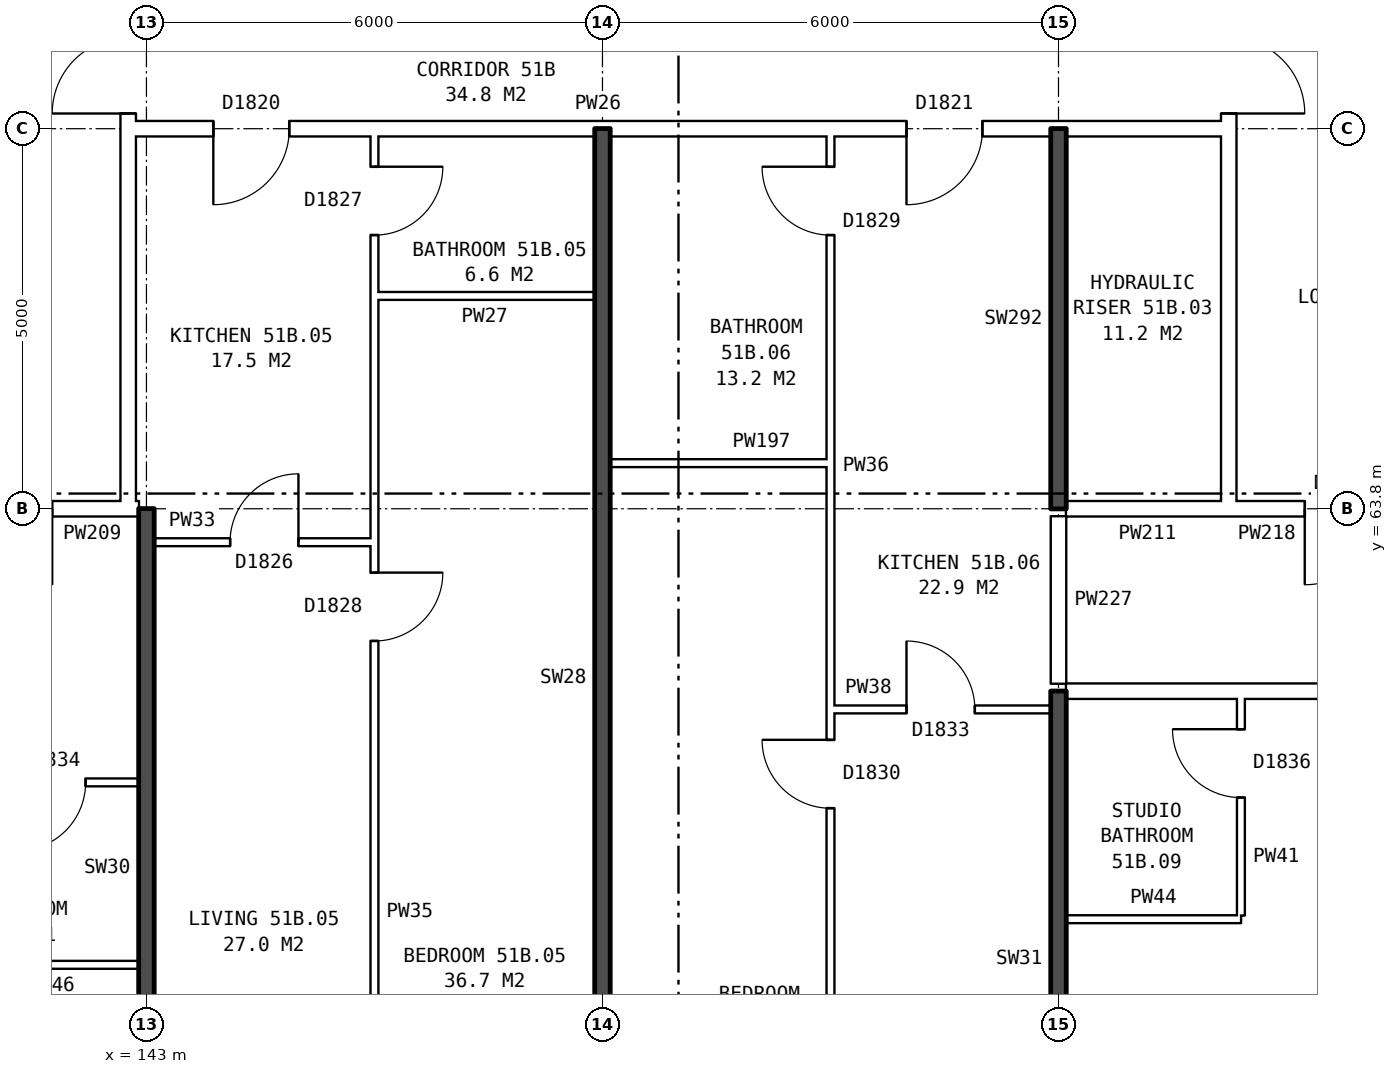
"""IFC4 building model, lengths in metres.
Left out: names, types, materials, properties, quantities, classifications, styles, units other than length and angle.
Written with IfcOpenShell. Run it as: python <this file> out.ifc"""

import sys

from ifc_helpers import new_model, si_unit, direction, frame, frame_2d, origin, place, context, subcontext, project, spatial, rectangle, extrude, element, fill, save


model = new_model("IFC4")
c1 = context("Model", 3, precision=1e-05, world=origin(), true_north=direction((0.0, 1.0)))
c2 = subcontext(c1, "Body", "Model", "MODEL_VIEW")
j1 = project(units=[si_unit("LENGTHUNIT", "METRE"), si_unit("PLANEANGLEUNIT", "RADIAN")], contexts=[c1])
p1 = place(None, origin())
s1 = spatial("IfcSite", under=j1, at=p1, CompositionType="ELEMENT")
p2 = place(p1, origin())
s2 = spatial("IfcBuilding", under=s1, at=p2, CompositionType="ELEMENT")
p3 = place(p2, frame((0.0, 0.0, 182.0)))
s3 = spatial("IfcBuildingStorey", under=s2, at=p3, CompositionType="ELEMENT", Elevation=182.0)
p4 = place(p3, frame((142.76, 63.9, 0.0), z_axis=(0.0, 0.0, 1.0), x_axis=(0.0, 1.0, 0.0)))
e1 = element("IfcWall", 1, at=p4, inside=s3, PredefinedType="PARTITIONING", context=c2, shape_type="SweptSolid", body=[
    extrude(rectangle(XDim=12.2, YDim=0.2, at=frame_2d((6.1, 0.0))), origin(), (0.0, 0.0, 1.0), 2.85),
])
p5 = place(p4, frame((5.1, 0.0, 0.0)))
e2 = element("IfcOpeningElement", 2, at=p5, cuts=e1, PredefinedType="OPENING", context=c2, shape_type="SweptSolid", body=[
    extrude(rectangle(XDim=2.0, YDim=2.1, at=frame_2d((1.0, 1.05))), frame((0.0, 0.11, 0.0), z_axis=(0.0, -1.0, 0.0), x_axis=(1.0, 0.0, 0.0)), (0.0, 0.0, 1.0), 0.22),
])
p6 = place(p3, frame((157.24, 63.9, 0.0), z_axis=(0.0, 0.0, 1.0), x_axis=(0.0, 1.0, 0.0)))
e3 = element("IfcWall", 3, at=p6, inside=s3, PredefinedType="PARTITIONING", context=c2, shape_type="SweptSolid", body=[
    extrude(rectangle(XDim=12.2, YDim=0.2, at=frame_2d((6.1, 0.0))), origin(), (0.0, 0.0, 1.0), 2.85),
])
p7 = place(p6, frame((5.1, 0.0, 0.0)))
e4 = element("IfcOpeningElement", 4, at=p7, cuts=e3, PredefinedType="OPENING", context=c2, shape_type="SweptSolid", body=[
    extrude(rectangle(XDim=2.0, YDim=2.1, at=frame_2d((1.0, 1.05))), frame((0.0, 0.11, 0.0), z_axis=(0.0, -1.0, 0.0), x_axis=(1.0, 0.0, 0.0)), (0.0, 0.0, 1.0), 0.22),
])
for number, where, z_axis, x_axis in (
    (5, (140.6, 57.8, 0.0), (0.0, 0.0, 1.0), (1.0, 0.0, 0.0)),
    (6, (155.1, 58.4, 0.0), (0.0, 0.0, 1.0), (1.0, 0.0, 0.0)),
):
    element("IfcWall", number, at=place(p3, frame(where, z_axis=z_axis, x_axis=x_axis)), inside=s3, PredefinedType="PARTITIONING", context=c2, shape_type="SweptSolid", body=[
        extrude(rectangle(XDim=2.3, YDim=0.1, at=frame_2d((1.15, 0.0))), origin(), (0.0, 0.0, 1.0), 2.85),
    ])
p8 = place(p3, frame((137.1, 60.2, 0.0), z_axis=(0.0, 0.0, 1.0), x_axis=(1.0, 0.0, 0.0)))
e7 = element("IfcWall", 7, at=p8, inside=s3, PredefinedType="PARTITIONING", context=c2, shape_type="SweptSolid", body=[
    extrude(rectangle(XDim=5.8, YDim=0.1, at=frame_2d((2.9, 0.0))), origin(), (0.0, 0.0, 1.0), 2.85),
])
p9 = place(p8, frame((1.3, 0.0, 0.0)))
e8 = element("IfcOpeningElement", 8, at=p9, cuts=e7, PredefinedType="OPENING", context=c2, shape_type="SweptSolid", body=[
    extrude(rectangle(XDim=0.9, YDim=2.1, at=frame_2d((0.45, 1.05))), frame((0.0, 0.06, 0.0), z_axis=(0.0, -1.0, 0.0), x_axis=(1.0, 0.0, 0.0)), (0.0, 0.0, 1.0), 0.12),
])
p10 = place(p8, frame((4.2, 0.0, 0.0)))
e9 = element("IfcOpeningElement", 9, at=p10, cuts=e7, PredefinedType="OPENING", context=c2, shape_type="SweptSolid", body=[
    extrude(rectangle(XDim=0.9, YDim=2.1, at=frame_2d((0.45, 1.05))), frame((0.0, 0.06, 0.0), z_axis=(0.0, -1.0, 0.0), x_axis=(1.0, 0.0, 0.0)), (0.0, 0.0, 1.0), 0.12),
])
p11 = place(p3, frame((152.0, 61.16, 0.0), z_axis=(0.0, 0.0, 1.0), x_axis=(1.0, 0.0, 0.0)))
e10 = element("IfcWall", 10, at=p11, inside=s3, PredefinedType="PARTITIONING", context=c2, shape_type="SweptSolid", body=[
    extrude(rectangle(XDim=2.9, YDim=0.1, at=frame_2d((1.45, 0.0))), origin(), (0.0, 0.0, 1.0), 2.85),
])
p12 = place(p11, frame((1.0, 0.0, 0.0)))
e11 = element("IfcOpeningElement", 11, at=p12, cuts=e10, PredefinedType="OPENING", context=c2, shape_type="SweptSolid", body=[
    extrude(rectangle(XDim=0.9, YDim=2.1, at=frame_2d((0.45, 1.05))), frame((0.0, 0.06, 0.0), z_axis=(0.0, -1.0, 0.0), x_axis=(1.0, 0.0, 0.0)), (0.0, 0.0, 1.0), 0.12),
])
p13 = place(p3, frame((155.1, 61.4, 0.0), z_axis=(0.0, 0.0, 1.0), x_axis=(1.0, 0.0, 0.0)))
e12 = element("IfcWall", 12, at=p13, inside=s3, PredefinedType="PARTITIONING", context=c2, shape_type="SweptSolid", body=[
    extrude(rectangle(XDim=14.79, YDim=0.2, at=frame_2d((7.395, 0.0))), origin(), (0.0, 0.0, 1.0), 2.85),
])
p14 = place(p13, frame((3.6, 0.0, 0.0)))
e13 = element("IfcOpeningElement", 13, at=p14, cuts=e12, PredefinedType="OPENING", context=c2, shape_type="SweptSolid", body=[
    extrude(rectangle(XDim=1.0, YDim=2.1, at=frame_2d((0.5, 1.05))), frame((0.0, 0.11, 0.0), z_axis=(0.0, -1.0, 0.0), x_axis=(1.0, 0.0, 0.0)), (0.0, 0.0, 1.0), 0.22),
])
p15 = place(p13, frame((11.045, 0.0, 0.0)))
e14 = element("IfcOpeningElement", 14, at=p15, cuts=e12, PredefinedType="OPENING", context=c2, shape_type="SweptSolid", body=[
    extrude(rectangle(XDim=1.0, YDim=2.1, at=frame_2d((0.5, 1.05))), frame((0.0, 0.11, 0.0), z_axis=(0.0, -1.0, 0.0), x_axis=(1.0, 0.0, 0.0)), (0.0, 0.0, 1.0), 0.22),
])
p16 = place(p3, frame((143.1, 63.36, 0.0), z_axis=(0.0, 0.0, 1.0), x_axis=(1.0, 0.0, 0.0)))
e15 = element("IfcWall", 15, at=p16, inside=s3, PredefinedType="PARTITIONING", context=c2, shape_type="SweptSolid", body=[
    extrude(rectangle(XDim=2.9, YDim=0.1, at=frame_2d((1.45, 0.0))), origin(), (0.0, 0.0, 1.0), 2.85),
])
p17 = place(p16, frame((1.0, 0.0, 0.0)))
e16 = element("IfcOpeningElement", 16, at=p17, cuts=e15, PredefinedType="OPENING", context=c2, shape_type="SweptSolid", body=[
    extrude(rectangle(XDim=0.9, YDim=2.1, at=frame_2d((0.45, 1.05))), frame((0.0, 0.06, 0.0), z_axis=(0.0, -1.0, 0.0), x_axis=(1.0, 0.0, 0.0)), (0.0, 0.0, 1.0), 0.12),
])
p18 = place(p3, frame((139.76, 63.8, 0.0), z_axis=(0.0, 0.0, 1.0), x_axis=(1.0, 0.0, 0.0)))
e17 = element("IfcWall", 17, at=p18, inside=s3, PredefinedType="PARTITIONING", context=c2, shape_type="SweptSolid", body=[
    extrude(rectangle(XDim=3.0, YDim=0.2, at=frame_2d((1.5, 0.0))), origin(), (0.0, 0.0, 1.0), 2.85),
])
p19 = place(p18, frame((1.0, 0.0, 0.0)))
e18 = element("IfcOpeningElement", 18, at=p19, cuts=e17, PredefinedType="OPENING", context=c2, shape_type="SweptSolid", body=[
    extrude(rectangle(XDim=1.0, YDim=2.1, at=frame_2d((0.5, 1.05))), frame((0.0, 0.11, 0.0), z_axis=(0.0, -1.0, 0.0), x_axis=(1.0, 0.0, 0.0)), (0.0, 0.0, 1.0), 0.22),
])
p20 = place(p3, frame((142.76, 63.8, 0.0), z_axis=(0.0, 0.0, 1.0), x_axis=(1.0, 0.0, 0.0)))
e19 = element("IfcWall", 19, at=p20, inside=s3, PredefinedType="PARTITIONING", context=c2, shape_type="SweptSolid", body=[
    extrude(rectangle(XDim=0.14, YDim=0.2, at=frame_2d((0.07, 0.0))), origin(), (0.0, 0.0, 1.0), 2.85),
])
p21 = place(p3, frame((155.1, 63.8, 0.0), z_axis=(0.0, 0.0, 1.0), x_axis=(1.0, 0.0, 0.0)))
e20 = element("IfcWall", 20, at=p21, inside=s3, PredefinedType="PARTITIONING", context=c2, shape_type="SweptSolid", body=[
    extrude(rectangle(XDim=2.14, YDim=0.2, at=frame_2d((1.07, 0.0))), origin(), (0.0, 0.0, 1.0), 2.85),
])
p22 = place(p3, frame((157.24, 63.8, 0.0), z_axis=(0.0, 0.0, 1.0), x_axis=(1.0, 0.0, 0.0)))
e21 = element("IfcWall", 21, at=p22, inside=s3, PredefinedType="PARTITIONING", context=c2, shape_type="SweptSolid", body=[
    extrude(rectangle(XDim=3.0, YDim=0.2, at=frame_2d((1.5, 0.0))), origin(), (0.0, 0.0, 1.0), 2.85),
])
p23 = place(p22, frame((1.0, 0.0, 0.0)))
e22 = element("IfcOpeningElement", 22, at=p23, cuts=e21, PredefinedType="OPENING", context=c2, shape_type="SweptSolid", body=[
    extrude(rectangle(XDim=1.0, YDim=2.1, at=frame_2d((0.5, 1.05))), frame((0.0, 0.11, 0.0), z_axis=(0.0, -1.0, 0.0), x_axis=(1.0, 0.0, 0.0)), (0.0, 0.0, 1.0), 0.22),
])
for number, where, z_axis, x_axis in (
    (23, (149.1, 64.4, 0.0), (0.0, 0.0, 1.0), (1.0, 0.0, 0.0)),
    (24, (146.0, 66.6, 0.0), (0.0, 0.0, 1.0), (1.0, 0.0, 0.0)),
):
    element("IfcWall", number, at=place(p3, frame(where, z_axis=z_axis, x_axis=x_axis)), inside=s3, PredefinedType="PARTITIONING", context=c2, shape_type="SweptSolid", body=[
        extrude(rectangle(XDim=2.9, YDim=0.1, at=frame_2d((1.45, 0.0))), origin(), (0.0, 0.0, 1.0), 2.85),
    ])
p24 = place(p3, frame((142.76, 68.8, 0.0), z_axis=(0.0, 0.0, 1.0), x_axis=(1.0, 0.0, 0.0)))
e25 = element("IfcWall", 25, at=p24, inside=s3, PredefinedType="PARTITIONING", context=c2, shape_type="SweptSolid", body=[
    extrude(rectangle(XDim=14.48, YDim=0.2, at=frame_2d((7.24, 0.0))), origin(), (0.0, 0.0, 1.0), 2.85),
])
p25 = place(p24, frame((1.12, 0.0, 0.0)))
e26 = element("IfcOpeningElement", 26, at=p25, cuts=e25, PredefinedType="OPENING", context=c2, shape_type="SweptSolid", body=[
    extrude(rectangle(XDim=1.0, YDim=2.1, at=frame_2d((0.5, 1.05))), frame((0.0, 0.11, 0.0), z_axis=(0.0, -1.0, 0.0), x_axis=(1.0, 0.0, 0.0)), (0.0, 0.0, 1.0), 0.22),
])
p26 = place(p24, frame((10.24, 0.0, 0.0)))
e27 = element("IfcOpeningElement", 27, at=p26, cuts=e25, PredefinedType="OPENING", context=c2, shape_type="SweptSolid", body=[
    extrude(rectangle(XDim=1.0, YDim=2.1, at=frame_2d((0.5, 1.05))), frame((0.0, 0.11, 0.0), z_axis=(0.0, -1.0, 0.0), x_axis=(1.0, 0.0, 0.0)), (0.0, 0.0, 1.0), 0.22),
])
p27 = place(p3, frame((143.0, 54.36, 0.0), z_axis=(0.0, 0.0, 1.0), x_axis=(0.0, 1.0, 0.0)))
e28 = element("IfcWall", 28, at=p27, inside=s3, PredefinedType="SOLIDWALL", context=c2, shape_type="SweptSolid", body=[
    extrude(rectangle(XDim=9.44, YDim=0.2, at=frame_2d((4.72, 0.0))), origin(), (0.0, 0.0, 1.0), 2.85),
])
p28 = place(p3, frame((146.0, 54.36, 0.0), z_axis=(0.0, 0.0, 1.0), x_axis=(0.0, 1.0, 0.0)))
e29 = element("IfcWall", 29, at=p28, inside=s3, PredefinedType="PARTITIONING", context=c2, shape_type="SweptSolid", body=[
    extrude(rectangle(XDim=14.34, YDim=0.1, at=frame_2d((7.17, 0.0))), origin(), (0.0, 0.0, 1.0), 2.85),
])
p29 = place(p28, frame((7.7, 0.0, 0.0)))
e30 = element("IfcOpeningElement", 30, at=p29, cuts=e29, PredefinedType="OPENING", context=c2, shape_type="SweptSolid", body=[
    extrude(rectangle(XDim=0.9, YDim=2.1, at=frame_2d((0.45, 1.05))), frame((0.0, 0.06, 0.0), z_axis=(0.0, -1.0, 0.0), x_axis=(1.0, 0.0, 0.0)), (0.0, 0.0, 1.0), 0.12),
])
p30 = place(p28, frame((13.04, 0.0, 0.0)))
e31 = element("IfcOpeningElement", 31, at=p30, cuts=e29, PredefinedType="OPENING", context=c2, shape_type="SweptSolid", body=[
    extrude(rectangle(XDim=0.9, YDim=2.1, at=frame_2d((0.45, 1.05))), frame((0.0, 0.06, 0.0), z_axis=(0.0, -1.0, 0.0), x_axis=(1.0, 0.0, 0.0)), (0.0, 0.0, 1.0), 0.12),
])
p31 = place(p3, frame((149.0, 54.36, 0.0), z_axis=(0.0, 0.0, 1.0), x_axis=(0.0, 1.0, 0.0)))
e32 = element("IfcWall", 32, at=p31, inside=s3, PredefinedType="SOLIDWALL", context=c2, shape_type="SweptSolid", body=[
    extrude(rectangle(XDim=14.44, YDim=0.2, at=frame_2d((7.22, 0.0))), origin(), (0.0, 0.0, 1.0), 2.85),
])
p32 = place(p3, frame((152.0, 54.36, 0.0), z_axis=(0.0, 0.0, 1.0), x_axis=(0.0, 1.0, 0.0)))
e33 = element("IfcWall", 33, at=p32, inside=s3, PredefinedType="PARTITIONING", context=c2, shape_type="SweptSolid", body=[
    extrude(rectangle(XDim=14.34, YDim=0.1, at=frame_2d((7.17, 0.0))), origin(), (0.0, 0.0, 1.0), 2.85),
])
p33 = place(p32, frame((5.5, 0.0, 0.0)))
e34 = element("IfcOpeningElement", 34, at=p33, cuts=e33, PredefinedType="OPENING", context=c2, shape_type="SweptSolid", body=[
    extrude(rectangle(XDim=0.9, YDim=2.1, at=frame_2d((0.45, 1.05))), frame((0.0, 0.06, 0.0), z_axis=(0.0, -1.0, 0.0), x_axis=(1.0, 0.0, 0.0)), (0.0, 0.0, 1.0), 0.12),
])
p34 = place(p32, frame((13.04, 0.0, 0.0)))
e35 = element("IfcOpeningElement", 35, at=p34, cuts=e33, PredefinedType="OPENING", context=c2, shape_type="SweptSolid", body=[
    extrude(rectangle(XDim=0.9, YDim=2.1, at=frame_2d((0.45, 1.05))), frame((0.0, 0.06, 0.0), z_axis=(0.0, -1.0, 0.0), x_axis=(1.0, 0.0, 0.0)), (0.0, 0.0, 1.0), 0.12),
])
p35 = place(p3, frame((155.0, 54.36, 0.0), z_axis=(0.0, 0.0, 1.0), x_axis=(0.0, 1.0, 0.0)))
e36 = element("IfcWall", 36, at=p35, inside=s3, PredefinedType="SOLIDWALL", context=c2, shape_type="SweptSolid", body=[
    extrude(rectangle(XDim=7.04, YDim=0.2, at=frame_2d((3.52, 0.0))), origin(), (0.0, 0.0, 1.0), 2.85),
])
p36 = place(p3, frame((155.0, 61.5, 0.0), z_axis=(0.0, 0.0, 1.0), x_axis=(0.0, 1.0, 0.0)))
e37 = element("IfcWall", 37, at=p36, inside=s3, PredefinedType="PARTITIONING", context=c2, shape_type="SweptSolid", body=[
    extrude(rectangle(XDim=2.2, YDim=0.2, at=frame_2d((1.1, 0.0))), origin(), (0.0, 0.0, 1.0), 2.85),
])
p37 = place(p3, frame((155.0, 63.8, 0.0), z_axis=(0.0, 0.0, 1.0), x_axis=(0.0, 1.0, 0.0)))
e38 = element("IfcWall", 38, at=p37, inside=s3, PredefinedType="SOLIDWALL", context=c2, shape_type="SweptSolid", body=[
    extrude(rectangle(XDim=5.0, YDim=0.2, at=frame_2d((2.5, 0.0))), origin(), (0.0, 0.0, 1.0), 2.85),
])
p38 = place(p3, frame((157.4, 58.45, 0.0), z_axis=(0.0, 0.0, 1.0), x_axis=(0.0, 1.0, 0.0)))
e39 = element("IfcWall", 39, at=p38, inside=s3, PredefinedType="PARTITIONING", context=c2, shape_type="SweptSolid", body=[
    extrude(rectangle(XDim=2.85, YDim=0.1, at=frame_2d((1.425, 0.0))), origin(), (0.0, 0.0, 1.0), 2.85),
])
p39 = place(p38, frame((1.55, 0.0, 0.0)))
e40 = element("IfcOpeningElement", 40, at=p39, cuts=e39, PredefinedType="OPENING", context=c2, shape_type="SweptSolid", body=[
    extrude(rectangle(XDim=0.9, YDim=2.1, at=frame_2d((0.45, 1.05))), frame((0.0, 0.06, 0.0), z_axis=(0.0, -1.0, 0.0), x_axis=(1.0, 0.0, 0.0)), (0.0, 0.0, 1.0), 0.12),
])
p40 = place(p5, origin())
e41 = element("IfcDoor", 41, at=p40, inside=s3, OperationType="DOUBLE_DOOR_SINGLE_SWING", PredefinedType="DOOR", context=c2, shape_type="SweptSolid", body=[
    extrude(rectangle(XDim=2.0, YDim=2.1, at=frame_2d((1.0, 1.05))), frame((0.0, 0.025, 0.0), z_axis=(0.0, -1.0, 0.0), x_axis=(1.0, 0.0, 0.0)), (0.0, 0.0, 1.0), 0.05),
])
fill(e2, e41)
p41 = place(p7, frame((2.0, 0.0, 0.0), z_axis=(0.0, 0.0, 1.0), x_axis=(-1.0, 0.0, 0.0)))
e42 = element("IfcDoor", 42, at=p41, inside=s3, OperationType="DOUBLE_DOOR_SINGLE_SWING", PredefinedType="DOOR", context=c2, shape_type="SweptSolid", body=[
    extrude(rectangle(XDim=2.0, YDim=2.1, at=frame_2d((1.0, 1.05))), frame((0.0, 0.025, 0.0), z_axis=(0.0, -1.0, 0.0), x_axis=(1.0, 0.0, 0.0)), (0.0, 0.0, 1.0), 0.05),
])
fill(e4, e42)
p42 = place(p23, frame((1.0, 0.0, 0.0), z_axis=(0.0, 0.0, 1.0), x_axis=(-1.0, 0.0, 0.0)))
e43 = element("IfcDoor", 43, at=p42, inside=s3, OperationType="SINGLE_SWING_RIGHT", PredefinedType="DOOR", context=c2, shape_type="SweptSolid", body=[
    extrude(rectangle(XDim=1.0, YDim=2.1, at=frame_2d((0.5, 1.05))), frame((0.0, 0.025, 0.0), z_axis=(0.0, -1.0, 0.0), x_axis=(1.0, 0.0, 0.0)), (0.0, 0.0, 1.0), 0.05),
])
fill(e22, e43)
p43 = place(p10, frame((0.9, 0.0, 0.0), z_axis=(0.0, 0.0, 1.0), x_axis=(-1.0, 0.0, 0.0)))
e44 = element("IfcDoor", 44, at=p43, inside=s3, OperationType="SINGLE_SWING_RIGHT", PredefinedType="DOOR", context=c2, shape_type="SweptSolid", body=[
    extrude(rectangle(XDim=0.9, YDim=2.1, at=frame_2d((0.45, 1.05))), frame((0.0, 0.025, 0.0), z_axis=(0.0, -1.0, 0.0), x_axis=(1.0, 0.0, 0.0)), (0.0, 0.0, 1.0), 0.05),
])
fill(e9, e44)
p44 = place(p29, frame((0.9, 0.0, 0.0), z_axis=(0.0, 0.0, 1.0), x_axis=(-1.0, 0.0, 0.0)))
e45 = element("IfcDoor", 45, at=p44, inside=s3, OperationType="SINGLE_SWING_LEFT", PredefinedType="DOOR", context=c2, shape_type="SweptSolid", body=[
    extrude(rectangle(XDim=0.9, YDim=2.1, at=frame_2d((0.45, 1.05))), frame((0.0, 0.025, 0.0), z_axis=(0.0, -1.0, 0.0), x_axis=(1.0, 0.0, 0.0)), (0.0, 0.0, 1.0), 0.05),
])
fill(e30, e45)
p45 = place(p25, frame((1.0, 0.0, 0.0), z_axis=(0.0, 0.0, 1.0), x_axis=(-1.0, 0.0, 0.0)))
e46 = element("IfcDoor", 46, at=p45, inside=s3, OperationType="SINGLE_SWING_RIGHT", PredefinedType="DOOR", context=c2, shape_type="SweptSolid", body=[
    extrude(rectangle(XDim=1.0, YDim=2.1, at=frame_2d((0.5, 1.05))), frame((0.0, 0.025, 0.0), z_axis=(0.0, -1.0, 0.0), x_axis=(1.0, 0.0, 0.0)), (0.0, 0.0, 1.0), 0.05),
])
fill(e26, e46)
p46 = place(p17, origin())
e47 = element("IfcDoor", 47, at=p46, inside=s3, OperationType="SINGLE_SWING_RIGHT", PredefinedType="DOOR", context=c2, shape_type="SweptSolid", body=[
    extrude(rectangle(XDim=0.9, YDim=2.1, at=frame_2d((0.45, 1.05))), frame((0.0, 0.025, 0.0), z_axis=(0.0, -1.0, 0.0), x_axis=(1.0, 0.0, 0.0)), (0.0, 0.0, 1.0), 0.05),
])
fill(e16, e47)
p47 = place(p30, frame((0.9, 0.0, 0.0), z_axis=(0.0, 0.0, 1.0), x_axis=(-1.0, 0.0, 0.0)))
e48 = element("IfcDoor", 48, at=p47, inside=s3, OperationType="SINGLE_SWING_LEFT", PredefinedType="DOOR", context=c2, shape_type="SweptSolid", body=[
    extrude(rectangle(XDim=0.9, YDim=2.1, at=frame_2d((0.45, 1.05))), frame((0.0, 0.025, 0.0), z_axis=(0.0, -1.0, 0.0), x_axis=(1.0, 0.0, 0.0)), (0.0, 0.0, 1.0), 0.05),
])
fill(e31, e48)
p48 = place(p33, origin())
e49 = element("IfcDoor", 49, at=p48, inside=s3, OperationType="SINGLE_SWING_RIGHT", PredefinedType="DOOR", context=c2, shape_type="SweptSolid", body=[
    extrude(rectangle(XDim=0.9, YDim=2.1, at=frame_2d((0.45, 1.05))), frame((0.0, 0.025, 0.0), z_axis=(0.0, -1.0, 0.0), x_axis=(1.0, 0.0, 0.0)), (0.0, 0.0, 1.0), 0.05),
])
fill(e34, e49)
p49 = place(p26, frame((1.0, 0.0, 0.0), z_axis=(0.0, 0.0, 1.0), x_axis=(-1.0, 0.0, 0.0)))
e50 = element("IfcDoor", 50, at=p49, inside=s3, OperationType="SINGLE_SWING_RIGHT", PredefinedType="DOOR", context=c2, shape_type="SweptSolid", body=[
    extrude(rectangle(XDim=1.0, YDim=2.1, at=frame_2d((0.5, 1.05))), frame((0.0, 0.025, 0.0), z_axis=(0.0, -1.0, 0.0), x_axis=(1.0, 0.0, 0.0)), (0.0, 0.0, 1.0), 0.05),
])
fill(e27, e50)
p50 = place(p12, origin())
e51 = element("IfcDoor", 51, at=p50, inside=s3, OperationType="SINGLE_SWING_LEFT", PredefinedType="DOOR", context=c2, shape_type="SweptSolid", body=[
    extrude(rectangle(XDim=0.9, YDim=2.1, at=frame_2d((0.45, 1.05))), frame((0.0, 0.025, 0.0), z_axis=(0.0, -1.0, 0.0), x_axis=(1.0, 0.0, 0.0)), (0.0, 0.0, 1.0), 0.05),
])
fill(e11, e51)
p51 = place(p34, origin())
e52 = element("IfcDoor", 52, at=p51, inside=s3, OperationType="SINGLE_SWING_RIGHT", PredefinedType="DOOR", context=c2, shape_type="SweptSolid", body=[
    extrude(rectangle(XDim=0.9, YDim=2.1, at=frame_2d((0.45, 1.05))), frame((0.0, 0.025, 0.0), z_axis=(0.0, -1.0, 0.0), x_axis=(1.0, 0.0, 0.0)), (0.0, 0.0, 1.0), 0.05),
])
fill(e35, e52)
p52 = place(p39, origin())
e53 = element("IfcDoor", 53, at=p52, inside=s3, OperationType="SINGLE_SWING_RIGHT", PredefinedType="DOOR", context=c2, shape_type="SweptSolid", body=[
    extrude(rectangle(XDim=0.9, YDim=2.1, at=frame_2d((0.45, 1.05))), frame((0.0, 0.025, 0.0), z_axis=(0.0, -1.0, 0.0), x_axis=(1.0, 0.0, 0.0)), (0.0, 0.0, 1.0), 0.05),
])
fill(e40, e53)
save(model, sys.argv[1])
